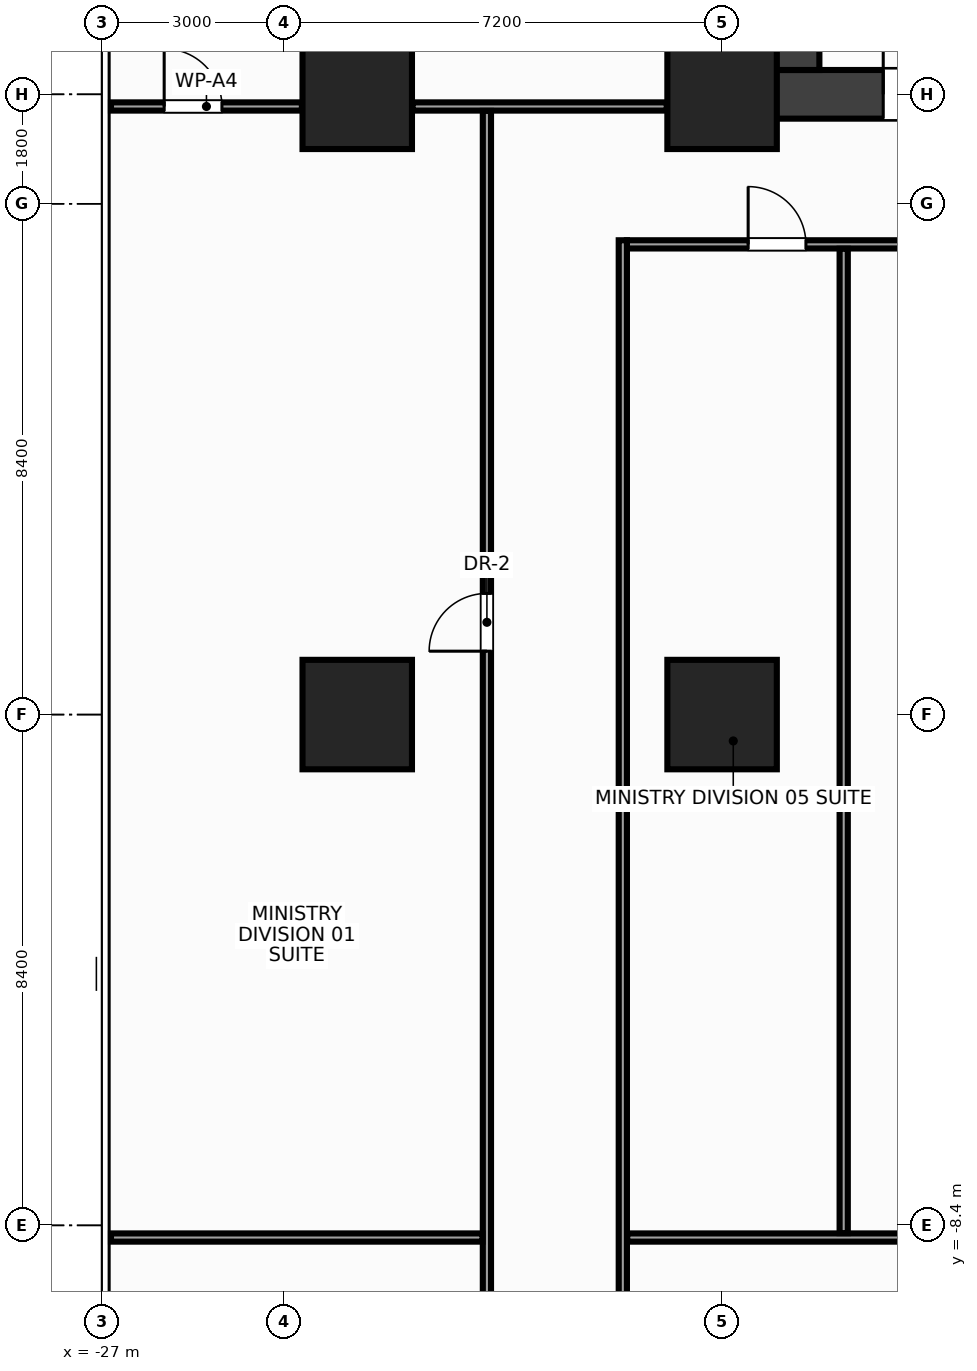
"""IFC4 building model, lengths in metres.
Left out: names, types, materials, properties, quantities, classifications, styles, units other than length and angle.
Written with IfcOpenShell. Run it as: python <this file> out.ifc"""

import sys

from ifc_helpers import new_model, si_unit, direction, frame, frame_2d, origin, origin_2d, place, context, subcontext, project, spatial, rectangle, extrude, source, transform, mapped, element, fill, save


model = new_model("IFC4")
c1 = context("Model", 3, precision=1e-05, world=origin(), true_north=direction((0.0, 1.0)))
c2 = subcontext(c1, "Body", "Model", "MODEL_VIEW")
j1 = project(units=[si_unit("LENGTHUNIT", "METRE"), si_unit("PLANEANGLEUNIT", "RADIAN")], contexts=[c1])
p1 = place(None, origin())
s1 = spatial("IfcSite", under=j1, at=p1, CompositionType="ELEMENT")
p2 = place(p1, origin())
s2 = spatial("IfcBuilding", under=s1, at=p2, CompositionType="ELEMENT")
p3 = place(p2, frame((0.0, 0.0, 38.0)))
s3 = spatial("IfcBuildingStorey", under=s2, at=p3, CompositionType="ELEMENT", Elevation=38.0)
m1 = source(origin(), c2, "Body", "SweptSolid", [
    extrude(rectangle(XDim=32.0, YDim=0.8, at=frame_2d((16.0, 0.0))), origin(), (0.0, 0.0, 1.0), 3.6),
])
p4 = place(p3, frame((-16.0, 10.2, 0.0), z_axis=(0.0, 0.0, 1.0), x_axis=(1.0, 0.0, 0.0)))
e1 = element("IfcWall", 1, at=p4, inside=s3, PredefinedType="SHEAR", context=c2, shape_type="MappedRepresentation", body=[
    mapped(m1, transform((0.0, 0.0, 0.0), x_axis=(1.0, 0.0, 0.0), y_axis=(0.0, 1.0, 0.0), z_axis=(0.0, 0.0, 1.0), scale=1.0)),
])
p5 = place(p4, frame((1.85, 0.0, 0.0)))
e2 = element("IfcOpeningElement", 2, at=p5, cuts=e1, PredefinedType="OPENING", context=c2, shape_type="SweptSolid", body=[
    extrude(rectangle(XDim=1.6, YDim=2.15, at=frame_2d((0.8, 1.075))), frame((0.0, 0.412, 0.0), z_axis=(0.0, -1.0, 0.0), x_axis=(1.0, 0.0, 0.0)), (0.0, 0.0, 1.0), 0.824),
])
p6 = place(p4, frame((28.55, 0.0, 0.0)))
e3 = element("IfcOpeningElement", 3, at=p6, cuts=e1, PredefinedType="OPENING", context=c2, shape_type="SweptSolid", body=[
    extrude(rectangle(XDim=1.6, YDim=2.15, at=frame_2d((0.8, 1.075))), frame((0.0, 0.412, 0.0), z_axis=(0.0, -1.0, 0.0), x_axis=(1.0, 0.0, 0.0)), (0.0, 0.0, 1.0), 0.824),
])
p7 = place(p4, frame((15.25, 0.0, 0.0)))
e4 = element("IfcOpeningElement", 4, at=p7, cuts=e1, PredefinedType="OPENING", context=c2, shape_type="SweptSolid", body=[
    extrude(rectangle(XDim=1.5, YDim=2.2, at=frame_2d((0.75, 1.1))), frame((0.0, 0.412, 0.0), z_axis=(0.0, -1.0, 0.0), x_axis=(1.0, 0.0, 0.0)), (0.0, 0.0, 1.0), 0.824),
])
m2 = source(origin(), c2, "Body", "SweptSolid", [
    extrude(rectangle(XDim=12.8, YDim=0.8, at=frame_2d((6.4, 0.0))), origin(), (0.0, 0.0, 1.0), 3.6),
])
p8 = place(p3, frame((-15.6, 10.6, 0.0), z_axis=(0.0, 0.0, 1.0), x_axis=(0.0, 1.0, 0.0)))
e5 = element("IfcWall", 5, at=p8, inside=s3, PredefinedType="SHEAR", context=c2, shape_type="MappedRepresentation", body=[
    mapped(m2, transform((0.0, 0.0, 0.0), x_axis=(1.0, 0.0, 0.0), y_axis=(0.0, 1.0, 0.0), z_axis=(0.0, 0.0, 1.0), scale=1.0)),
])
m3 = source(origin(), c2, "Body", "SweptSolid", [
    extrude(rectangle(XDim=1.8, YDim=1.8, at=origin_2d()), origin(), (0.0, 0.0, 1.0), 3.6),
])
for number, where, z_axis, x_axis in (
    (6, (-16.8, 0.0, 0.0), (0.0, 0.0, 1.0), (1.0, 0.0, 0.0)),
    (7, (-16.8, 10.2, 0.0), (0.0, 0.0, 1.0), (1.0, 0.0, 0.0)),
    (8, (-22.8, 0.0, 0.0), (0.0, 0.0, 1.0), (1.0, 0.0, 0.0)),
    (9, (-22.8, 10.2, 0.0), (0.0, 0.0, 1.0), (1.0, 0.0, 0.0)),
):
    element("IfcColumn", number, at=place(p3, frame(where, z_axis=z_axis, x_axis=x_axis)), inside=s3, PredefinedType="COLUMN", context=c2, shape_type="MappedRepresentation", body=[
        mapped(m3, transform((0.0, 0.0, 0.0), x_axis=(1.0, 0.0, 0.0), y_axis=(0.0, 1.0, 0.0), z_axis=(0.0, 0.0, 1.0), scale=1.0)),
    ])
m4 = source(origin(), c2, "Body", "SweptSolid", [
    extrude(rectangle(XDim=3.14, YDim=0.135, at=frame_2d((1.57, 0.0))), origin(), (0.0, 0.0, 1.0), 2.435),
])
p9 = place(p3, frame((-26.85, 10.0, 0.0), z_axis=(0.0, 0.0, 1.0), x_axis=(1.0, 0.0, 0.0)))
e10 = element("IfcWall", 10, at=p9, inside=s3, PredefinedType="PARTITIONING", context=c2, shape_type="MappedRepresentation", body=[
    mapped(m4, transform((0.0, 0.0, 0.0), x_axis=(1.0, 0.0, 0.0), y_axis=(0.0, 1.0, 0.0), z_axis=(0.0, 0.0, 1.0), scale=1.0)),
])
p10 = place(p9, frame((0.875, 0.0, 0.0)))
e11 = element("IfcOpeningElement", 11, at=p10, cuts=e10, PredefinedType="OPENING", context=c2, shape_type="SweptSolid", body=[
    extrude(rectangle(XDim=0.95, YDim=2.15, at=frame_2d((0.475, 1.075))), frame((0.0, 0.08, 0.0), z_axis=(0.0, -1.0, 0.0), x_axis=(1.0, 0.0, 0.0)), (0.0, 0.0, 1.0), 0.159),
])
m5 = source(origin(), c2, "Body", "SweptSolid", [
    extrude(rectangle(XDim=4.18, YDim=0.135, at=frame_2d((2.09, 0.0))), origin(), (0.0, 0.0, 1.0), 2.745),
])
p11 = place(p3, frame((-21.89, 10.0, 0.0), z_axis=(0.0, 0.0, 1.0), x_axis=(1.0, 0.0, 0.0)))
e12 = element("IfcWall", 12, at=p11, inside=s3, PredefinedType="PARTITIONING", context=c2, shape_type="MappedRepresentation", body=[
    mapped(m5, transform((0.0, 0.0, 0.0), x_axis=(1.0, 0.0, 0.0), y_axis=(0.0, 1.0, 0.0), z_axis=(0.0, 0.0, 1.0), scale=1.0)),
])
m6 = source(origin(), c2, "Body", "SweptSolid", [
    extrude(rectangle(XDim=36.73, YDim=0.135, at=frame_2d((18.365, 0.0))), origin(), (0.0, 0.0, 1.0), 2.745),
])
p12 = place(p3, frame((-18.365, 7.732, 0.0), z_axis=(0.0, 0.0, 1.0), x_axis=(1.0, 0.0, 0.0)))
e13 = element("IfcWall", 13, at=p12, inside=s3, PredefinedType="PARTITIONING", context=c2, shape_type="MappedRepresentation", body=[
    mapped(m6, transform((0.0, 0.0, 0.0), x_axis=(1.0, 0.0, 0.0), y_axis=(0.0, 1.0, 0.0), z_axis=(0.0, 0.0, 1.0), scale=1.0)),
])
p13 = place(p12, frame((10.49, 0.0, 0.0)))
e14 = element("IfcOpeningElement", 14, at=p13, cuts=e13, PredefinedType="OPENING", context=c2, shape_type="SweptSolid", body=[
    extrude(rectangle(XDim=0.95, YDim=2.15, at=frame_2d((0.475, 1.075))), frame((0.0, 0.08, 0.0), z_axis=(0.0, -1.0, 0.0), x_axis=(1.0, 0.0, 0.0)), (0.0, 0.0, 1.0), 0.159),
])
p14 = place(p12, frame((25.29, 0.0, 0.0)))
e15 = element("IfcOpeningElement", 15, at=p14, cuts=e13, PredefinedType="OPENING", context=c2, shape_type="SweptSolid", body=[
    extrude(rectangle(XDim=0.95, YDim=2.15, at=frame_2d((0.475, 1.075))), frame((0.0, 0.08, 0.0), z_axis=(0.0, -1.0, 0.0), x_axis=(1.0, 0.0, 0.0)), (0.0, 0.0, 1.0), 0.159),
])
p15 = place(p12, frame((1.994, 0.0, 0.0)))
e16 = element("IfcOpeningElement", 16, at=p15, cuts=e13, PredefinedType="OPENING", context=c2, shape_type="SweptSolid", body=[
    extrude(rectangle(XDim=0.95, YDim=2.15, at=frame_2d((0.475, 1.075))), frame((0.0, 0.08, 0.0), z_axis=(0.0, -1.0, 0.0), x_axis=(1.0, 0.0, 0.0)), (0.0, 0.0, 1.0), 0.159),
])
p16 = place(p12, frame((33.786, 0.0, 0.0)))
e17 = element("IfcOpeningElement", 17, at=p16, cuts=e13, PredefinedType="OPENING", context=c2, shape_type="SweptSolid", body=[
    extrude(rectangle(XDim=0.95, YDim=2.15, at=frame_2d((0.475, 1.075))), frame((0.0, 0.08, 0.0), z_axis=(0.0, -1.0, 0.0), x_axis=(1.0, 0.0, 0.0)), (0.0, 0.0, 1.0), 0.159),
])
m7 = source(origin(), c2, "Body", "SweptSolid", [
    extrude(rectangle(XDim=24.123, YDim=0.135, at=frame_2d((12.061, 0.0))), origin(), (0.0, 0.0, 1.0), 2.745),
])
p17 = place(p3, frame((-20.667, -14.195, 0.0), z_axis=(0.0, 0.0, 1.0), x_axis=(0.0, 1.0, 0.0)))
e18 = element("IfcWall", 18, at=p17, inside=s3, PredefinedType="PARTITIONING", context=c2, shape_type="MappedRepresentation", body=[
    mapped(m7, transform((0.0, 0.0, 0.0), x_axis=(1.0, 0.0, 0.0), y_axis=(0.0, 1.0, 0.0), z_axis=(0.0, 0.0, 1.0), scale=1.0)),
])
p18 = place(p17, frame((15.238, 0.0, 0.0)))
e19 = element("IfcOpeningElement", 19, at=p18, cuts=e18, PredefinedType="OPENING", context=c2, shape_type="SweptSolid", body=[
    extrude(rectangle(XDim=0.95, YDim=2.15, at=frame_2d((0.475, 1.075))), frame((0.0, 0.08, 0.0), z_axis=(0.0, -1.0, 0.0), x_axis=(1.0, 0.0, 0.0)), (0.0, 0.0, 1.0), 0.159),
])
p19 = place(p17, frame((1.249, 0.0, 0.0)))
e20 = element("IfcOpeningElement", 20, at=p19, cuts=e18, PredefinedType="OPENING", context=c2, shape_type="SweptSolid", body=[
    extrude(rectangle(XDim=0.95, YDim=2.15, at=frame_2d((0.475, 1.075))), frame((0.0, 0.08, 0.0), z_axis=(0.0, -1.0, 0.0), x_axis=(1.0, 0.0, 0.0)), (0.0, 0.0, 1.0), 0.159),
])
m8 = source(origin(), c2, "Body", "SweptSolid", [
    extrude(rectangle(XDim=21.995, YDim=0.135, at=frame_2d((10.998, 0.0))), origin(), (0.0, 0.0, 1.0), 2.745),
])
p20 = place(p3, frame((-18.433, -14.195, 0.0), z_axis=(0.0, 0.0, 1.0), x_axis=(0.0, 1.0, 0.0)))
e21 = element("IfcWall", 21, at=p20, inside=s3, PredefinedType="PARTITIONING", context=c2, shape_type="MappedRepresentation", body=[
    mapped(m8, transform((0.0, 0.0, 0.0), x_axis=(1.0, 0.0, 0.0), y_axis=(0.0, 1.0, 0.0), z_axis=(0.0, 0.0, 1.0), scale=1.0)),
])
p21 = place(p20, frame((0.809, 0.0, 0.0)))
e22 = element("IfcOpeningElement", 22, at=p21, cuts=e21, PredefinedType="OPENING", context=c2, shape_type="SweptSolid", body=[
    extrude(rectangle(XDim=0.95, YDim=2.15, at=frame_2d((0.475, 1.075))), frame((0.0, 0.08, 0.0), z_axis=(0.0, -1.0, 0.0), x_axis=(1.0, 0.0, 0.0)), (0.0, 0.0, 1.0), 0.159),
])
m9 = source(origin(), c2, "Body", "SweptSolid", [
    extrude(rectangle(XDim=6.11, YDim=0.135, at=frame_2d((3.055, 0.0))), origin(), (0.0, 0.0, 1.0), 2.745),
])
p22 = place(p3, frame((-26.85, -8.6, 0.0), z_axis=(0.0, 0.0, 1.0), x_axis=(1.0, 0.0, 0.0)))
e23 = element("IfcWall", 23, at=p22, inside=s3, PredefinedType="PARTITIONING", context=c2, shape_type="MappedRepresentation", body=[
    mapped(m9, transform((0.0, 0.0, 0.0), x_axis=(1.0, 0.0, 0.0), y_axis=(0.0, 1.0, 0.0), z_axis=(0.0, 0.0, 1.0), scale=1.0)),
])
m10 = source(origin(), c2, "Body", "SweptSolid", [
    extrude(rectangle(XDim=36.72, YDim=0.135, at=frame_2d((18.36, 0.0))), origin(), (0.0, 0.0, 1.0), 2.745),
])
p23 = place(p3, frame((-18.36, -8.6, 0.0), z_axis=(0.0, 0.0, 1.0), x_axis=(1.0, 0.0, 0.0)))
e24 = element("IfcWall", 24, at=p23, inside=s3, PredefinedType="PARTITIONING", context=c2, shape_type="MappedRepresentation", body=[
    mapped(m10, transform((0.0, 0.0, 0.0), x_axis=(1.0, 0.0, 0.0), y_axis=(0.0, 1.0, 0.0), z_axis=(0.0, 0.0, 1.0), scale=1.0)),
])
p24 = place(p23, frame((10.485, 0.0, 0.0)))
e25 = element("IfcOpeningElement", 25, at=p24, cuts=e24, PredefinedType="OPENING", context=c2, shape_type="SweptSolid", body=[
    extrude(rectangle(XDim=0.95, YDim=2.15, at=frame_2d((0.475, 1.075))), frame((0.0, 0.08, 0.0), z_axis=(0.0, -1.0, 0.0), x_axis=(1.0, 0.0, 0.0)), (0.0, 0.0, 1.0), 0.159),
])
p25 = place(p23, frame((16.285, 0.0, 0.0)))
e26 = element("IfcOpeningElement", 26, at=p25, cuts=e24, PredefinedType="OPENING", context=c2, shape_type="SweptSolid", body=[
    extrude(rectangle(XDim=0.95, YDim=2.15, at=frame_2d((0.475, 1.075))), frame((0.0, 0.08, 0.0), z_axis=(0.0, -1.0, 0.0), x_axis=(1.0, 0.0, 0.0)), (0.0, 0.0, 1.0), 0.159),
])
p26 = place(p23, frame((27.685, 0.0, 0.0)))
e27 = element("IfcOpeningElement", 27, at=p26, cuts=e24, PredefinedType="OPENING", context=c2, shape_type="SweptSolid", body=[
    extrude(rectangle(XDim=0.95, YDim=2.15, at=frame_2d((0.475, 1.075))), frame((0.0, 0.08, 0.0), z_axis=(0.0, -1.0, 0.0), x_axis=(1.0, 0.0, 0.0)), (0.0, 0.0, 1.0), 0.159),
])
m11 = source(origin(), c2, "Body", "SweptSolid", [
    extrude(rectangle(XDim=16.188, YDim=0.135, at=frame_2d((8.094, 0.0))), origin(), (0.0, 0.0, 1.0), 2.37),
])
p27 = place(p3, frame((-14.8, -8.528, 0.0), z_axis=(0.0, 0.0, 1.0), x_axis=(0.0, 1.0, 0.0)))
e28 = element("IfcWall", 28, at=p27, inside=s3, PredefinedType="PARTITIONING", context=c2, shape_type="MappedRepresentation", body=[
    mapped(m11, transform((0.0, 0.0, 0.0), x_axis=(1.0, 0.0, 0.0), y_axis=(0.0, 1.0, 0.0), z_axis=(0.0, 0.0, 1.0), scale=1.0)),
])
m12 = source(origin(), c2, "Body", "SweptSolid", [
    extrude(rectangle(XDim=1.6, YDim=2.15, at=frame_2d((0.8, 1.075))), frame((0.0, 0.025, 0.0), z_axis=(0.0, -1.0, 0.0), x_axis=(1.0, 0.0, 0.0)), (0.0, 0.0, 1.0), 0.05),
])
p28 = place(p5, origin())
e29 = element("IfcDoor", 29, at=p28, inside=s3, OperationType="DOUBLE_DOOR_SINGLE_SWING", PredefinedType="DOOR", context=c2, shape_type="MappedRepresentation", body=[
    mapped(m12, transform((0.0, 0.0, 0.0), x_axis=(1.0, 0.0, 0.0), y_axis=(0.0, 1.0, 0.0), z_axis=(0.0, 0.0, 1.0), scale=1.0)),
])
fill(e2, e29)
m13 = source(origin(), c2, "Body", "SweptSolid", [
    extrude(rectangle(XDim=0.95, YDim=2.15, at=frame_2d((0.475, 1.075))), frame((0.0, 0.025, 0.0), z_axis=(0.0, -1.0, 0.0), x_axis=(1.0, 0.0, 0.0)), (0.0, 0.0, 1.0), 0.05),
])
p29 = place(p18, origin())
e30 = element("IfcDoor", 30, at=p29, inside=s3, OperationType="SINGLE_SWING_LEFT", PredefinedType="DOOR", context=c2, shape_type="MappedRepresentation", body=[
    mapped(m13, transform((0.0, 0.0, 0.0), x_axis=(1.0, 0.0, 0.0), y_axis=(0.0, 1.0, 0.0), z_axis=(0.0, 0.0, 1.0), scale=1.0)),
])
fill(e19, e30)
p30 = place(p15, origin())
e31 = element("IfcDoor", 31, at=p30, inside=s3, OperationType="SINGLE_SWING_LEFT", PredefinedType="DOOR", context=c2, shape_type="MappedRepresentation", body=[
    mapped(m13, transform((0.0, 0.0, 0.0), x_axis=(1.0, 0.0, 0.0), y_axis=(0.0, 1.0, 0.0), z_axis=(0.0, 0.0, 1.0), scale=1.0)),
])
fill(e16, e31)
p31 = place(p10, origin())
e32 = element("IfcDoor", 32, at=p31, inside=s3, OperationType="SINGLE_SWING_LEFT", PredefinedType="DOOR", context=c2, shape_type="MappedRepresentation", body=[
    mapped(m13, transform((0.0, 0.0, 0.0), x_axis=(1.0, 0.0, 0.0), y_axis=(0.0, 1.0, 0.0), z_axis=(0.0, 0.0, 1.0), scale=1.0)),
])
fill(e11, e32)
save(model, sys.argv[1])
